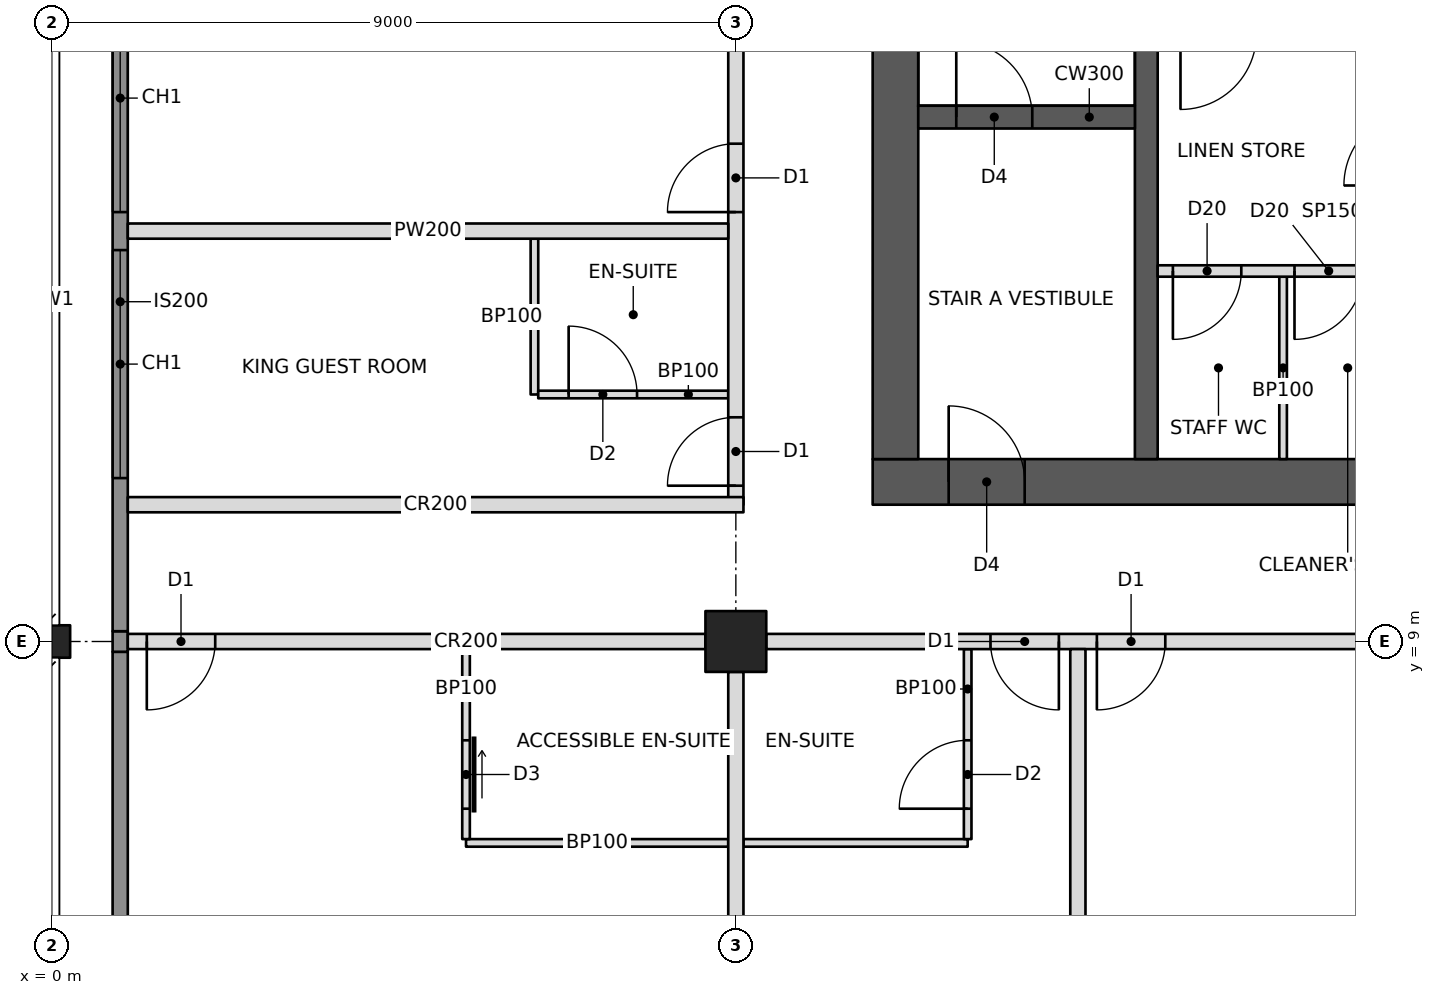
"""IFC4 building model, lengths in metres.
Left out: names, types, materials, properties, quantities, classifications, styles, units other than length and angle.
Written with IfcOpenShell. Run it as: python <this file> out.ifc"""

import sys

from ifc_helpers import new_model, si_unit, direction, frame, frame_2d, origin, origin_2d, place, context, subcontext, project, spatial, rectangle, hollow_rectangle, i_section, extrude, element, fill, save


model = new_model("IFC4")
c1 = context("Model", 3, precision=1e-05, world=origin(), true_north=direction((0.0, 1.0)))
c2 = subcontext(c1, "Body", "Model", "MODEL_VIEW")
j1 = project(units=[si_unit("LENGTHUNIT", "METRE"), si_unit("PLANEANGLEUNIT", "RADIAN")], contexts=[c1])
p1 = place(None, origin())
s1 = spatial("IfcSite", under=j1, at=p1, CompositionType="ELEMENT")
p2 = place(p1, origin())
s2 = spatial("IfcBuilding", under=s1, at=p2, CompositionType="ELEMENT")
p3 = place(p2, frame((0.0, 0.0, 204.6)))
s3 = spatial("IfcBuildingStorey", under=s2, at=p3, CompositionType="ELEMENT", Elevation=204.6)
p4 = place(p3, frame((0.0, 9.0, 0.0), z_axis=(0.0, 0.0, 1.0), x_axis=(0.0, 1.0, 0.0)))
e1 = element("IfcColumn", 1, at=p4, inside=s3, PredefinedType="COLUMN", context=c2, shape_type="SweptSolid", body=[
    extrude(i_section(OverallWidth=0.427, OverallDepth=0.483, WebThickness=0.051, FlangeThickness=0.082, at=origin_2d()), origin(), (0.0, 0.0, 1.0), 3.4),
])
p5 = place(p3, frame((9.0, 9.0, 0.0), z_axis=(0.0, 0.0, 1.0), x_axis=(1.0, 0.0, 0.0)))
e2 = element("IfcColumn", 2, at=p5, inside=s3, PredefinedType="COLUMN", context=c2, shape_type="SweptSolid", body=[
    extrude(hollow_rectangle(XDim=0.8, YDim=0.8, WallThickness=0.05, at=origin_2d()), origin(), (0.0, 0.0, 1.0), 3.4),
])
p6 = place(p3, frame((10.8, 11.1, 0.0), z_axis=(0.0, 0.0, 1.0), x_axis=(1.0, 0.0, 0.0)))
e3 = element("IfcWall", 3, at=p6, inside=s3, PredefinedType="SHEAR", context=c2, shape_type="SweptSolid", body=[
    extrude(rectangle(XDim=23.4, YDim=0.6, at=frame_2d((11.7, 0.0))), origin(), (0.0, 0.0, 1.0), 3.4),
])
p7 = place(p6, frame((1.0, 0.0, 0.0)))
e4 = element("IfcOpeningElement", 4, at=p7, cuts=e3, PredefinedType="OPENING", context=c2, shape_type="SweptSolid", body=[
    extrude(rectangle(XDim=1.0, YDim=2.1, at=frame_2d((0.5, 1.05))), frame((0.0, 0.31, 0.0), z_axis=(0.0, -1.0, 0.0), x_axis=(1.0, 0.0, 0.0)), (0.0, 0.0, 1.0), 0.62),
])
p8 = place(p6, frame((17.2, 0.0, 0.0)))
e5 = element("IfcOpeningElement", 5, at=p8, cuts=e3, PredefinedType="OPENING", context=c2, shape_type="SweptSolid", body=[
    extrude(rectangle(XDim=1.8, YDim=2.1, at=frame_2d((0.9, 1.05))), frame((0.0, 0.31, 0.0), z_axis=(0.0, -1.0, 0.0), x_axis=(1.0, 0.0, 0.0)), (0.0, 0.0, 1.0), 0.62),
])
p9 = place(p3, frame((11.1, 11.4, 0.0), z_axis=(0.0, 0.0, 1.0), x_axis=(0.0, 1.0, 0.0)))
e6 = element("IfcWall", 6, at=p9, inside=s3, PredefinedType="SHEAR", context=c2, shape_type="SweptSolid", body=[
    extrude(rectangle(XDim=13.2, YDim=0.6, at=frame_2d((6.6, 0.0))), origin(), (0.0, 0.0, 1.0), 3.4),
])
p10 = place(p3, frame((14.4, 11.4, 0.0), z_axis=(0.0, 0.0, 1.0), x_axis=(0.0, 1.0, 0.0)))
e7 = element("IfcWall", 7, at=p10, inside=s3, PredefinedType="SHEAR", context=c2, shape_type="SweptSolid", body=[
    extrude(rectangle(XDim=13.2, YDim=0.3, at=frame_2d((6.6, 0.0))), origin(), (0.0, 0.0, 1.0), 3.4),
])
p11 = place(p3, frame((11.4, 15.9, 0.0), z_axis=(0.0, 0.0, 1.0), x_axis=(1.0, 0.0, 0.0)))
e8 = element("IfcWall", 8, at=p11, inside=s3, PredefinedType="SHEAR", context=c2, shape_type="SweptSolid", body=[
    extrude(rectangle(XDim=2.85, YDim=0.3, at=frame_2d((1.425, 0.0))), origin(), (0.0, 0.0, 1.0), 3.4),
])
p12 = place(p11, frame((0.5, 0.0, 0.0)))
e9 = element("IfcOpeningElement", 9, at=p12, cuts=e8, PredefinedType="OPENING", context=c2, shape_type="SweptSolid", body=[
    extrude(rectangle(XDim=1.0, YDim=2.1, at=frame_2d((0.5, 1.05))), frame((0.0, 0.16, 0.0), z_axis=(0.0, -1.0, 0.0), x_axis=(1.0, 0.0, 0.0)), (0.0, 0.0, 1.0), 0.32),
])
p13 = place(p3, frame((1.0, 9.0, 0.0), z_axis=(0.0, 0.0, 1.0), x_axis=(1.0, 0.0, 0.0)))
e10 = element("IfcWall", 10, at=p13, inside=s3, PredefinedType="PARTITIONING", context=c2, shape_type="SweptSolid", body=[
    extrude(rectangle(XDim=7.6, YDim=0.2, at=frame_2d((3.8, 0.0))), origin(), (0.0, 0.0, 1.0), 2.438),
])
p14 = place(p13, frame((0.25, 0.0, 0.0)))
e11 = element("IfcOpeningElement", 11, at=p14, cuts=e10, PredefinedType="OPENING", context=c2, shape_type="SweptSolid", body=[
    extrude(rectangle(XDim=0.9, YDim=2.1, at=frame_2d((0.45, 1.05))), frame((0.0, 0.11, 0.0), z_axis=(0.0, -1.0, 0.0), x_axis=(1.0, 0.0, 0.0)), (0.0, 0.0, 1.0), 0.22),
])
p15 = place(p3, frame((9.4, 9.0, 0.0), z_axis=(0.0, 0.0, 1.0), x_axis=(1.0, 0.0, 0.0)))
e12 = element("IfcWall", 12, at=p15, inside=s3, PredefinedType="PARTITIONING", context=c2, shape_type="SweptSolid", body=[
    extrude(rectangle(XDim=8.2, YDim=0.2, at=frame_2d((4.1, 0.0))), origin(), (0.0, 0.0, 1.0), 2.405),
])
p16 = place(p15, frame((2.95, 0.0, 0.0)))
e13 = element("IfcOpeningElement", 13, at=p16, cuts=e12, PredefinedType="OPENING", context=c2, shape_type="SweptSolid", body=[
    extrude(rectangle(XDim=0.9, YDim=2.1, at=frame_2d((0.45, 1.05))), frame((0.0, 0.11, 0.0), z_axis=(0.0, -1.0, 0.0), x_axis=(1.0, 0.0, 0.0)), (0.0, 0.0, 1.0), 0.22),
])
p17 = place(p15, frame((4.35, 0.0, 0.0)))
e14 = element("IfcOpeningElement", 14, at=p17, cuts=e12, PredefinedType="OPENING", context=c2, shape_type="SweptSolid", body=[
    extrude(rectangle(XDim=0.9, YDim=2.1, at=frame_2d((0.45, 1.05))), frame((0.0, 0.11, 0.0), z_axis=(0.0, -1.0, 0.0), x_axis=(1.0, 0.0, 0.0)), (0.0, 0.0, 1.0), 0.22),
])
p18 = place(p3, frame((9.0, 10.8, 0.0), z_axis=(0.0, 0.0, 1.0), x_axis=(0.0, 1.0, 0.0)))
e15 = element("IfcWall", 15, at=p18, inside=s3, PredefinedType="PARTITIONING", context=c2, shape_type="SweptSolid", body=[
    extrude(rectangle(XDim=6.8, YDim=0.2, at=frame_2d((3.4, 0.0))), origin(), (0.0, 0.0, 1.0), 2.405),
])
p19 = place(p18, frame((0.25, 0.0, 0.0)))
e16 = element("IfcOpeningElement", 16, at=p19, cuts=e15, PredefinedType="OPENING", context=c2, shape_type="SweptSolid", body=[
    extrude(rectangle(XDim=0.9, YDim=2.1, at=frame_2d((0.45, 1.05))), frame((0.0, 0.11, 0.0), z_axis=(0.0, -1.0, 0.0), x_axis=(1.0, 0.0, 0.0)), (0.0, 0.0, 1.0), 0.22),
])
p20 = place(p18, frame((3.85, 0.0, 0.0)))
e17 = element("IfcOpeningElement", 17, at=p20, cuts=e15, PredefinedType="OPENING", context=c2, shape_type="SweptSolid", body=[
    extrude(rectangle(XDim=0.9, YDim=2.1, at=frame_2d((0.45, 1.05))), frame((0.0, 0.11, 0.0), z_axis=(0.0, -1.0, 0.0), x_axis=(1.0, 0.0, 0.0)), (0.0, 0.0, 1.0), 0.22),
])
p21 = place(p3, frame((1.0, 10.8, 0.0), z_axis=(0.0, 0.0, 1.0), x_axis=(1.0, 0.0, 0.0)))
e18 = element("IfcWall", 18, at=p21, inside=s3, PredefinedType="PARTITIONING", context=c2, shape_type="SweptSolid", body=[
    extrude(rectangle(XDim=8.1, YDim=0.2, at=frame_2d((4.05, 0.0))), origin(), (0.0, 0.0, 1.0), 2.404),
])
p22 = place(p3, frame((9.0, 8.6, 0.0), z_axis=(0.0, 0.0, 1.0), x_axis=(0.0, -1.0, 0.0)))
e19 = element("IfcWall", 19, at=p22, inside=s3, PredefinedType="PARTITIONING", context=c2, shape_type="SweptSolid", body=[
    extrude(rectangle(XDim=7.6, YDim=0.2, at=frame_2d((3.8, 0.0))), origin(), (0.0, 0.0, 1.0), 2.438),
])
p23 = place(p3, frame((13.5, 8.9, 0.0), z_axis=(0.0, 0.0, 1.0), x_axis=(0.0, -1.0, 0.0)))
e20 = element("IfcWall", 20, at=p23, inside=s3, PredefinedType="PARTITIONING", context=c2, shape_type="SweptSolid", body=[
    extrude(rectangle(XDim=7.9, YDim=0.2, at=frame_2d((3.95, 0.0))), origin(), (0.0, 0.0, 1.0), 2.404),
])
p24 = place(p3, frame((5.45, 6.35, 0.0), z_axis=(0.0, 0.0, 1.0), x_axis=(1.0, 0.0, 0.0)))
e21 = element("IfcWall", 21, at=p24, inside=s3, PredefinedType="PARTITIONING", context=c2, shape_type="SweptSolid", body=[
    extrude(rectangle(XDim=3.45, YDim=0.1, at=frame_2d((1.725, 0.0))), origin(), (0.0, 0.0, 1.0), 2.438),
])
p25 = place(p3, frame((5.45, 8.9, 0.0), z_axis=(0.0, 0.0, 1.0), x_axis=(0.0, -1.0, 0.0)))
e22 = element("IfcWall", 22, at=p25, inside=s3, PredefinedType="PARTITIONING", context=c2, shape_type="SweptSolid", body=[
    extrude(rectangle(XDim=2.5, YDim=0.1, at=frame_2d((1.25, 0.0))), origin(), (0.0, 0.0, 1.0), 2.438),
])
p26 = place(p25, frame((1.2, 0.0, 0.0)))
e23 = element("IfcOpeningElement", 23, at=p26, cuts=e22, PredefinedType="OPENING", context=c2, shape_type="SweptSolid", body=[
    extrude(rectangle(XDim=0.9, YDim=2.1, at=frame_2d((0.45, 1.05))), frame((0.0, 0.06, 0.0), z_axis=(0.0, -1.0, 0.0), x_axis=(1.0, 0.0, 0.0)), (0.0, 0.0, 1.0), 0.12),
])
p27 = place(p3, frame((9.1, 6.35, 0.0), z_axis=(0.0, 0.0, 1.0), x_axis=(1.0, 0.0, 0.0)))
e24 = element("IfcWall", 24, at=p27, inside=s3, PredefinedType="PARTITIONING", context=c2, shape_type="SweptSolid", body=[
    extrude(rectangle(XDim=2.95, YDim=0.1, at=frame_2d((1.475, 0.0))), origin(), (0.0, 0.0, 1.0), 2.438),
])
p28 = place(p3, frame((12.05, 8.9, 0.0), z_axis=(0.0, 0.0, 1.0), x_axis=(0.0, -1.0, 0.0)))
e25 = element("IfcWall", 25, at=p28, inside=s3, PredefinedType="PARTITIONING", context=c2, shape_type="SweptSolid", body=[
    extrude(rectangle(XDim=2.5, YDim=0.1, at=frame_2d((1.25, 0.0))), origin(), (0.0, 0.0, 1.0), 2.404),
])
p29 = place(p28, frame((1.2, 0.0, 0.0)))
e26 = element("IfcOpeningElement", 26, at=p29, cuts=e25, PredefinedType="OPENING", context=c2, shape_type="SweptSolid", body=[
    extrude(rectangle(XDim=0.9, YDim=2.1, at=frame_2d((0.45, 1.05))), frame((0.0, 0.06, 0.0), z_axis=(0.0, -1.0, 0.0), x_axis=(1.0, 0.0, 0.0)), (0.0, 0.0, 1.0), 0.12),
])
p30 = place(p3, frame((8.9, 14.4, 0.0), z_axis=(0.0, 0.0, 1.0), x_axis=(-1.0, 0.0, 0.0)))
e27 = element("IfcWall", 27, at=p30, inside=s3, PredefinedType="PARTITIONING", context=c2, shape_type="SweptSolid", body=[
    extrude(rectangle(XDim=7.9, YDim=0.2, at=frame_2d((3.95, 0.0))), origin(), (0.0, 0.0, 1.0), 2.404),
])
p31 = place(p3, frame((6.35, 12.25, 0.0), z_axis=(0.0, 0.0, 1.0), x_axis=(0.0, 1.0, 0.0)))
e28 = element("IfcWall", 28, at=p31, inside=s3, PredefinedType="PARTITIONING", context=c2, shape_type="SweptSolid", body=[
    extrude(rectangle(XDim=2.05, YDim=0.1, at=frame_2d((1.025, 0.0))), origin(), (0.0, 0.0, 1.0), 3.2),
])
p32 = place(p3, frame((8.9, 12.25, 0.0), z_axis=(0.0, 0.0, 1.0), x_axis=(-1.0, 0.0, 0.0)))
e29 = element("IfcWall", 29, at=p32, inside=s3, PredefinedType="PARTITIONING", context=c2, shape_type="SweptSolid", body=[
    extrude(rectangle(XDim=2.5, YDim=0.1, at=frame_2d((1.25, 0.0))), origin(), (0.0, 0.0, 1.0), 2.404),
])
p33 = place(p32, frame((1.2, 0.0, 0.0)))
e30 = element("IfcOpeningElement", 30, at=p33, cuts=e29, PredefinedType="OPENING", context=c2, shape_type="SweptSolid", body=[
    extrude(rectangle(XDim=0.9, YDim=2.1, at=frame_2d((0.45, 1.05))), frame((0.0, 0.06, 0.0), z_axis=(0.0, -1.0, 0.0), x_axis=(1.0, 0.0, 0.0)), (0.0, 0.0, 1.0), 0.12),
])
p34 = place(p3, frame((14.55, 13.875, 0.0), z_axis=(0.0, 0.0, 1.0), x_axis=(1.0, 0.0, 0.0)))
e31 = element("IfcWall", 31, at=p34, inside=s3, PredefinedType="PARTITIONING", context=c2, shape_type="SweptSolid", body=[
    extrude(rectangle(XDim=3.3, YDim=0.15, at=frame_2d((1.65, 0.0))), origin(), (0.0, 0.0, 1.0), 3.2),
])
p35 = place(p34, frame((0.2, 0.0, 0.0)))
e32 = element("IfcOpeningElement", 32, at=p35, cuts=e31, PredefinedType="OPENING", context=c2, shape_type="SweptSolid", body=[
    extrude(rectangle(XDim=0.9, YDim=2.1, at=frame_2d((0.45, 1.05))), frame((0.0, 0.085, 0.0), z_axis=(0.0, -1.0, 0.0), x_axis=(1.0, 0.0, 0.0)), (0.0, 0.0, 1.0), 0.17),
])
p36 = place(p34, frame((1.8, 0.0, 0.0)))
e33 = element("IfcOpeningElement", 33, at=p36, cuts=e31, PredefinedType="OPENING", context=c2, shape_type="SweptSolid", body=[
    extrude(rectangle(XDim=0.9, YDim=2.1, at=frame_2d((0.45, 1.05))), frame((0.0, 0.085, 0.0), z_axis=(0.0, -1.0, 0.0), x_axis=(1.0, 0.0, 0.0)), (0.0, 0.0, 1.0), 0.17),
])
p37 = place(p3, frame((16.2, 11.4, 0.0), z_axis=(0.0, 0.0, 1.0), x_axis=(0.0, 1.0, 0.0)))
e34 = element("IfcWall", 34, at=p37, inside=s3, PredefinedType="PARTITIONING", context=c2, shape_type="SweptSolid", body=[
    extrude(rectangle(XDim=2.4, YDim=0.1, at=frame_2d((1.2, 0.0))), origin(), (0.0, 0.0, 1.0), 3.2),
])
p38 = place(p3, frame((0.9, 4.607, 0.0), z_axis=(0.0, 0.0, 1.0), x_axis=(0.0, 1.0, 0.0)))
e35 = element("IfcWall", 35, at=p38, inside=s3, PredefinedType="SOLIDWALL", context=c2, shape_type="SweptSolid", body=[
    extrude(rectangle(XDim=4.257, YDim=0.2, at=frame_2d((2.129, 0.0))), origin(), (0.0, 0.0, 1.0), 3.2),
])
p39 = place(p3, frame((0.9, 8.865, 0.0), z_axis=(0.0, 0.0, 1.0), x_axis=(0.0, 1.0, 0.0)))
e36 = element("IfcWall", 36, at=p39, inside=s3, PredefinedType="SOLIDWALL", context=c2, shape_type="SweptSolid", body=[
    extrude(rectangle(XDim=0.271, YDim=0.2, at=frame_2d((0.135, 0.0))), origin(), (0.0, 0.0, 1.0), 2.438),
])
p40 = place(p3, frame((0.9, 9.135, 0.0), z_axis=(0.0, 0.0, 1.0), x_axis=(0.0, 1.0, 0.0)))
e37 = element("IfcWall", 37, at=p40, inside=s3, PredefinedType="SOLIDWALL", context=c2, shape_type="SweptSolid", body=[
    extrude(rectangle(XDim=8.671, YDim=0.2, at=frame_2d((4.335, 0.0))), origin(), (0.0, 0.0, 1.0), 3.2),
])
p41 = place(p40, frame((2.015, 0.0, 0.6)))
e38 = element("IfcOpeningElement", 38, at=p41, cuts=e37, PredefinedType="OPENING", context=c2, shape_type="SweptSolid", body=[
    extrude(rectangle(XDim=3.0, YDim=2.2, at=frame_2d((1.5, 1.1))), frame((0.0, 0.11, 0.0), z_axis=(0.0, -1.0, 0.0), x_axis=(1.0, 0.0, 0.0)), (0.0, 0.0, 1.0), 0.22),
])
p42 = place(p40, frame((5.515, 0.0, 0.6)))
e39 = element("IfcOpeningElement", 39, at=p42, cuts=e37, PredefinedType="OPENING", context=c2, shape_type="SweptSolid", body=[
    extrude(rectangle(XDim=3.0, YDim=2.2, at=frame_2d((1.5, 1.1))), frame((0.0, 0.11, 0.0), z_axis=(0.0, -1.0, 0.0), x_axis=(1.0, 0.0, 0.0)), (0.0, 0.0, 1.0), 0.22),
])
p43 = place(p41, origin())
e40 = element("IfcWindow", 40, at=p43, inside=s3, PartitioningType="TRIPLE_PANEL_VERTICAL", PredefinedType="WINDOW", context=c2, shape_type="SweptSolid", body=[
    extrude(rectangle(XDim=3.0, YDim=2.2, at=frame_2d((1.5, 1.1))), frame((0.0, 0.03, 0.0), z_axis=(0.0, -1.0, 0.0), x_axis=(1.0, 0.0, 0.0)), (0.0, 0.0, 1.0), 0.06),
])
fill(e38, e40)
p44 = place(p42, origin())
e41 = element("IfcWindow", 41, at=p44, inside=s3, PartitioningType="TRIPLE_PANEL_VERTICAL", PredefinedType="WINDOW", context=c2, shape_type="SweptSolid", body=[
    extrude(rectangle(XDim=3.0, YDim=2.2, at=frame_2d((1.5, 1.1))), frame((0.0, 0.03, 0.0), z_axis=(0.0, -1.0, 0.0), x_axis=(1.0, 0.0, 0.0)), (0.0, 0.0, 1.0), 0.06),
])
fill(e39, e41)
p45 = place(p26, origin())
e42 = element("IfcDoor", 42, at=p45, inside=s3, OperationType="SLIDING_TO_LEFT", PredefinedType="DOOR", context=c2, shape_type="SweptSolid", body=[
    extrude(rectangle(XDim=0.9, YDim=2.1, at=frame_2d((0.45, 1.05))), frame((0.0, 0.025, 0.0), z_axis=(0.0, -1.0, 0.0), x_axis=(1.0, 0.0, 0.0)), (0.0, 0.0, 1.0), 0.05),
])
fill(e23, e42)
p46 = place(p14, frame((0.9, 0.0, 0.0), z_axis=(0.0, 0.0, 1.0), x_axis=(-1.0, 0.0, 0.0)))
e43 = element("IfcDoor", 43, at=p46, inside=s3, OperationType="SINGLE_SWING_RIGHT", PredefinedType="DOOR", context=c2, shape_type="SweptSolid", body=[
    extrude(rectangle(XDim=0.9, YDim=2.1, at=frame_2d((0.45, 1.05))), frame((0.0, 0.025, 0.0), z_axis=(0.0, -1.0, 0.0), x_axis=(1.0, 0.0, 0.0)), (0.0, 0.0, 1.0), 0.05),
])
fill(e11, e43)
p47 = place(p29, frame((0.9, 0.0, 0.0), z_axis=(0.0, 0.0, 1.0), x_axis=(-1.0, 0.0, 0.0)))
e44 = element("IfcDoor", 44, at=p47, inside=s3, OperationType="SINGLE_SWING_LEFT", PredefinedType="DOOR", context=c2, shape_type="SweptSolid", body=[
    extrude(rectangle(XDim=0.9, YDim=2.1, at=frame_2d((0.45, 1.05))), frame((0.0, 0.025, 0.0), z_axis=(0.0, -1.0, 0.0), x_axis=(1.0, 0.0, 0.0)), (0.0, 0.0, 1.0), 0.05),
])
fill(e26, e44)
p48 = place(p16, frame((0.9, 0.0, 0.0), z_axis=(0.0, 0.0, 1.0), x_axis=(-1.0, 0.0, 0.0)))
e45 = element("IfcDoor", 45, at=p48, inside=s3, OperationType="SINGLE_SWING_LEFT", PredefinedType="DOOR", context=c2, shape_type="SweptSolid", body=[
    extrude(rectangle(XDim=0.9, YDim=2.1, at=frame_2d((0.45, 1.05))), frame((0.0, 0.025, 0.0), z_axis=(0.0, -1.0, 0.0), x_axis=(1.0, 0.0, 0.0)), (0.0, 0.0, 1.0), 0.05),
])
fill(e13, e45)
p49 = place(p17, frame((0.9, 0.0, 0.0), z_axis=(0.0, 0.0, 1.0), x_axis=(-1.0, 0.0, 0.0)))
e46 = element("IfcDoor", 46, at=p49, inside=s3, OperationType="SINGLE_SWING_RIGHT", PredefinedType="DOOR", context=c2, shape_type="SweptSolid", body=[
    extrude(rectangle(XDim=0.9, YDim=2.1, at=frame_2d((0.45, 1.05))), frame((0.0, 0.025, 0.0), z_axis=(0.0, -1.0, 0.0), x_axis=(1.0, 0.0, 0.0)), (0.0, 0.0, 1.0), 0.05),
])
fill(e14, e46)
p50 = place(p33, frame((0.9, 0.0, 0.0), z_axis=(0.0, 0.0, 1.0), x_axis=(-1.0, 0.0, 0.0)))
e47 = element("IfcDoor", 47, at=p50, inside=s3, OperationType="SINGLE_SWING_LEFT", PredefinedType="DOOR", context=c2, shape_type="SweptSolid", body=[
    extrude(rectangle(XDim=0.9, YDim=2.1, at=frame_2d((0.45, 1.05))), frame((0.0, 0.025, 0.0), z_axis=(0.0, -1.0, 0.0), x_axis=(1.0, 0.0, 0.0)), (0.0, 0.0, 1.0), 0.05),
])
fill(e30, e47)
p51 = place(p19, origin())
e48 = element("IfcDoor", 48, at=p51, inside=s3, OperationType="SINGLE_SWING_LEFT", PredefinedType="DOOR", context=c2, shape_type="SweptSolid", body=[
    extrude(rectangle(XDim=0.9, YDim=2.1, at=frame_2d((0.45, 1.05))), frame((0.0, 0.025, 0.0), z_axis=(0.0, -1.0, 0.0), x_axis=(1.0, 0.0, 0.0)), (0.0, 0.0, 1.0), 0.05),
])
fill(e16, e48)
p52 = place(p20, origin())
e49 = element("IfcDoor", 49, at=p52, inside=s3, OperationType="SINGLE_SWING_LEFT", PredefinedType="DOOR", context=c2, shape_type="SweptSolid", body=[
    extrude(rectangle(XDim=0.9, YDim=2.1, at=frame_2d((0.45, 1.05))), frame((0.0, 0.025, 0.0), z_axis=(0.0, -1.0, 0.0), x_axis=(1.0, 0.0, 0.0)), (0.0, 0.0, 1.0), 0.05),
])
fill(e17, e49)
p53 = place(p35, frame((0.9, 0.0, 0.0), z_axis=(0.0, 0.0, 1.0), x_axis=(-1.0, 0.0, 0.0)))
e50 = element("IfcDoor", 50, at=p53, inside=s3, OperationType="SINGLE_SWING_RIGHT", PredefinedType="DOOR", context=c2, shape_type="SweptSolid", body=[
    extrude(rectangle(XDim=0.9, YDim=2.1, at=frame_2d((0.45, 1.05))), frame((0.0, 0.025, 0.0), z_axis=(0.0, -1.0, 0.0), x_axis=(1.0, 0.0, 0.0)), (0.0, 0.0, 1.0), 0.05),
])
fill(e32, e50)
p54 = place(p36, frame((0.9, 0.0, 0.0), z_axis=(0.0, 0.0, 1.0), x_axis=(-1.0, 0.0, 0.0)))
e51 = element("IfcDoor", 51, at=p54, inside=s3, OperationType="SINGLE_SWING_RIGHT", PredefinedType="DOOR", context=c2, shape_type="SweptSolid", body=[
    extrude(rectangle(XDim=0.9, YDim=2.1, at=frame_2d((0.45, 1.05))), frame((0.0, 0.025, 0.0), z_axis=(0.0, -1.0, 0.0), x_axis=(1.0, 0.0, 0.0)), (0.0, 0.0, 1.0), 0.05),
])
fill(e33, e51)
p55 = place(p7, origin())
e52 = element("IfcDoor", 52, at=p55, inside=s3, OperationType="SINGLE_SWING_LEFT", PredefinedType="DOOR", context=c2, shape_type="SweptSolid", body=[
    extrude(rectangle(XDim=1.0, YDim=2.1, at=frame_2d((0.5, 1.05))), frame((0.0, 0.025, 0.0), z_axis=(0.0, -1.0, 0.0), x_axis=(1.0, 0.0, 0.0)), (0.0, 0.0, 1.0), 0.05),
])
fill(e4, e52)
p56 = place(p12, origin())
e53 = element("IfcDoor", 53, at=p56, inside=s3, OperationType="SINGLE_SWING_LEFT", PredefinedType="DOOR", context=c2, shape_type="SweptSolid", body=[
    extrude(rectangle(XDim=1.0, YDim=2.1, at=frame_2d((0.5, 1.05))), frame((0.0, 0.025, 0.0), z_axis=(0.0, -1.0, 0.0), x_axis=(1.0, 0.0, 0.0)), (0.0, 0.0, 1.0), 0.05),
])
fill(e9, e53)
save(model, sys.argv[1])
